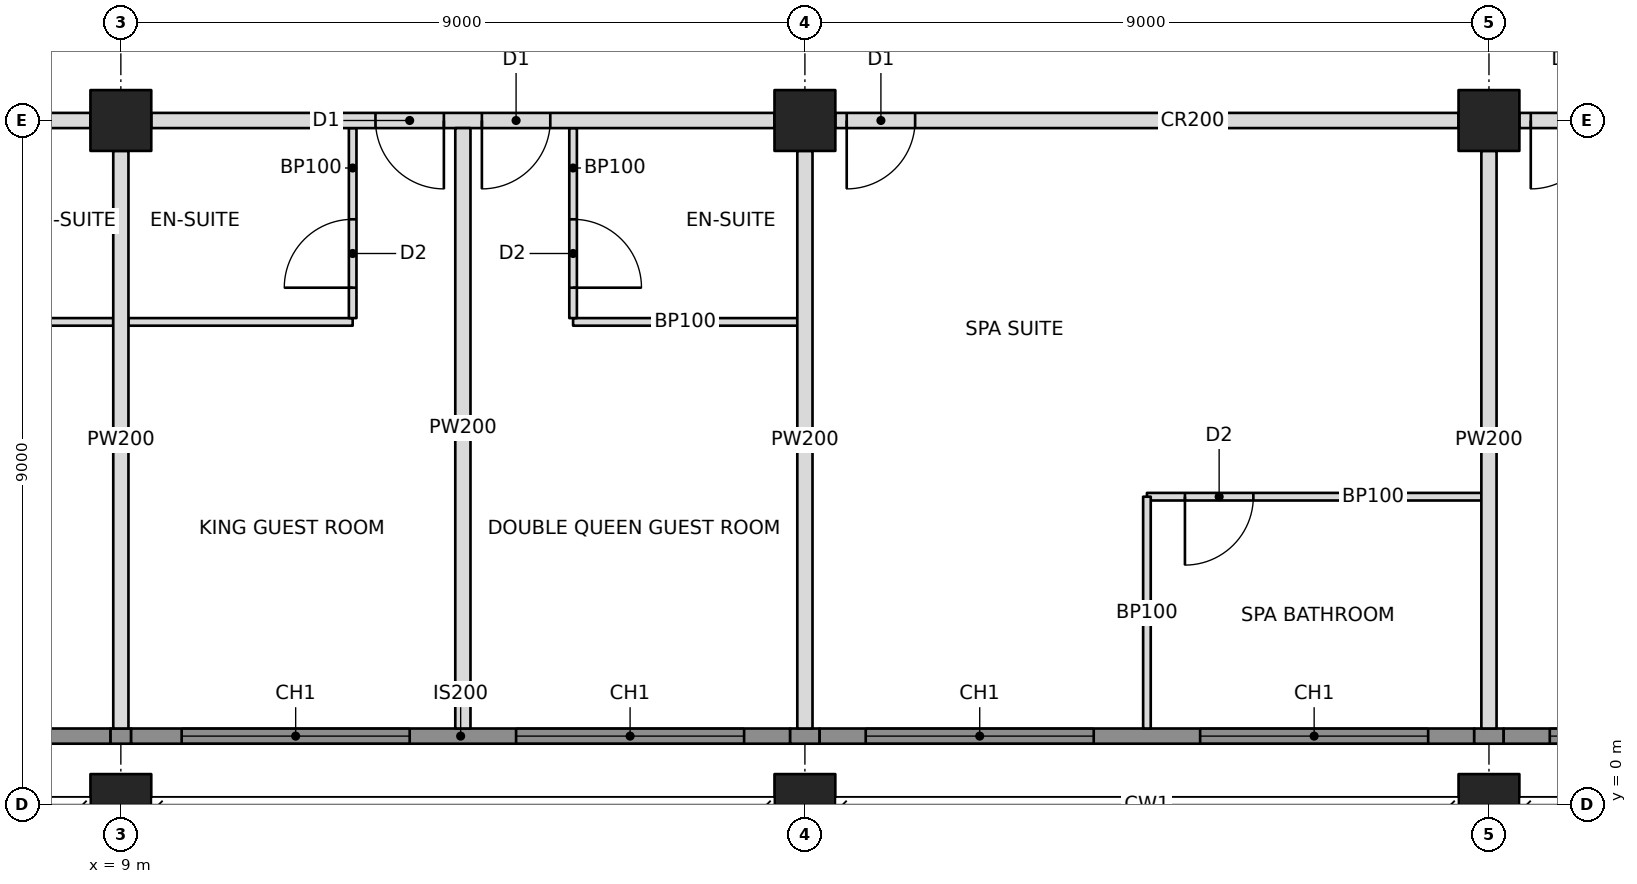
"""IFC4 building model, lengths in metres.
Left out: names, types, materials, properties, quantities, classifications, styles, units other than length and angle.
Written with IfcOpenShell. Run it as: python <this file> out.ifc"""

import sys

from ifc_helpers import new_model, si_unit, direction, frame, frame_2d, origin, origin_2d, place, context, subcontext, project, spatial, rectangle, hollow_rectangle, extrude, element, fill, save


model = new_model("IFC4")
c1 = context("Model", 3, precision=1e-05, world=origin(), true_north=direction((0.0, 1.0)))
c2 = subcontext(c1, "Body", "Model", "MODEL_VIEW")
j1 = project(units=[si_unit("LENGTHUNIT", "METRE"), si_unit("PLANEANGLEUNIT", "RADIAN")], contexts=[c1])
p1 = place(None, origin())
s1 = spatial("IfcSite", under=j1, at=p1, CompositionType="ELEMENT")
p2 = place(p1, origin())
s2 = spatial("IfcBuilding", under=s1, at=p2, CompositionType="ELEMENT")
p3 = place(p2, frame((0.0, 0.0, 191.0)))
s3 = spatial("IfcBuildingStorey", under=s2, at=p3, CompositionType="ELEMENT", Elevation=191.0)
p4 = place(p3, frame((9.0, 0.0, 0.0), z_axis=(0.0, 0.0, 1.0), x_axis=(1.0, 0.0, 0.0)))
e1 = element("IfcColumn", 1, at=p4, inside=s3, PredefinedType="COLUMN", context=c2, shape_type="SweptSolid", body=[
    extrude(hollow_rectangle(XDim=0.8, YDim=0.8, WallThickness=0.07, at=origin_2d()), origin(), (0.0, 0.0, 1.0), 3.4),
])
p5 = place(p3, frame((9.0, 9.0, 0.0), z_axis=(0.0, 0.0, 1.0), x_axis=(1.0, 0.0, 0.0)))
e2 = element("IfcColumn", 2, at=p5, inside=s3, PredefinedType="COLUMN", context=c2, shape_type="SweptSolid", body=[
    extrude(hollow_rectangle(XDim=0.8, YDim=0.8, WallThickness=0.06, at=origin_2d()), origin(), (0.0, 0.0, 1.0), 3.4),
])
p6 = place(p3, frame((18.0, 0.0, 0.0), z_axis=(0.0, 0.0, 1.0), x_axis=(1.0, 0.0, 0.0)))
e3 = element("IfcColumn", 3, at=p6, inside=s3, PredefinedType="COLUMN", context=c2, shape_type="SweptSolid", body=[
    extrude(hollow_rectangle(XDim=0.8, YDim=0.8, WallThickness=0.07, at=origin_2d()), origin(), (0.0, 0.0, 1.0), 3.4),
])
p7 = place(p3, frame((18.0, 9.0, 0.0), z_axis=(0.0, 0.0, 1.0), x_axis=(1.0, 0.0, 0.0)))
e4 = element("IfcColumn", 4, at=p7, inside=s3, PredefinedType="COLUMN", context=c2, shape_type="SweptSolid", body=[
    extrude(hollow_rectangle(XDim=0.8, YDim=0.8, WallThickness=0.06, at=origin_2d()), origin(), (0.0, 0.0, 1.0), 3.4),
])
p8 = place(p3, frame((27.0, 0.0, 0.0), z_axis=(0.0, 0.0, 1.0), x_axis=(1.0, 0.0, 0.0)))
e5 = element("IfcColumn", 5, at=p8, inside=s3, PredefinedType="COLUMN", context=c2, shape_type="SweptSolid", body=[
    extrude(hollow_rectangle(XDim=0.8, YDim=0.8, WallThickness=0.07, at=origin_2d()), origin(), (0.0, 0.0, 1.0), 3.4),
])
p9 = place(p3, frame((27.0, 9.0, 0.0), z_axis=(0.0, 0.0, 1.0), x_axis=(1.0, 0.0, 0.0)))
e6 = element("IfcColumn", 6, at=p9, inside=s3, PredefinedType="COLUMN", context=c2, shape_type="SweptSolid", body=[
    extrude(hollow_rectangle(XDim=0.8, YDim=0.8, WallThickness=0.06, at=origin_2d()), origin(), (0.0, 0.0, 1.0), 3.4),
])
p10 = place(p3, frame((3.0, 0.9, 0.0), z_axis=(0.0, 0.0, 1.0), x_axis=(1.0, 0.0, 0.0)))
e7 = element("IfcWall", 7, at=p10, inside=s3, PredefinedType="SOLIDWALL", context=c2, shape_type="SweptSolid", body=[
    extrude(rectangle(XDim=5.865, YDim=0.2, at=frame_2d((2.932, 0.0))), origin(), (0.0, 0.0, 1.0), 3.2),
])
p11 = place(p10, frame((1.45, 0.0, 0.6)))
e8 = element("IfcOpeningElement", 8, at=p11, cuts=e7, PredefinedType="OPENING", context=c2, shape_type="SweptSolid", body=[
    extrude(rectangle(XDim=3.0, YDim=2.2, at=frame_2d((1.5, 1.1))), frame((0.0, 0.11, 0.0), z_axis=(0.0, -1.0, 0.0), x_axis=(1.0, 0.0, 0.0)), (0.0, 0.0, 1.0), 0.22),
])
p12 = place(p3, frame((1.0, 9.0, 0.0), z_axis=(0.0, 0.0, 1.0), x_axis=(1.0, 0.0, 0.0)))
e9 = element("IfcWall", 9, at=p12, inside=s3, PredefinedType="PARTITIONING", context=c2, shape_type="SweptSolid", body=[
    extrude(rectangle(XDim=7.6, YDim=0.2, at=frame_2d((3.8, 0.0))), origin(), (0.0, 0.0, 1.0), 2.438),
])
p13 = place(p12, frame((0.25, 0.0, 0.0)))
e10 = element("IfcOpeningElement", 10, at=p13, cuts=e9, PredefinedType="OPENING", context=c2, shape_type="SweptSolid", body=[
    extrude(rectangle(XDim=0.9, YDim=2.1, at=frame_2d((0.45, 1.05))), frame((0.0, 0.11, 0.0), z_axis=(0.0, -1.0, 0.0), x_axis=(1.0, 0.0, 0.0)), (0.0, 0.0, 1.0), 0.22),
])
p14 = place(p3, frame((9.4, 9.0, 0.0), z_axis=(0.0, 0.0, 1.0), x_axis=(1.0, 0.0, 0.0)))
e11 = element("IfcWall", 11, at=p14, inside=s3, PredefinedType="PARTITIONING", context=c2, shape_type="SweptSolid", body=[
    extrude(rectangle(XDim=8.2, YDim=0.2, at=frame_2d((4.1, 0.0))), origin(), (0.0, 0.0, 1.0), 2.405),
])
p15 = place(p14, frame((2.95, 0.0, 0.0)))
e12 = element("IfcOpeningElement", 12, at=p15, cuts=e11, PredefinedType="OPENING", context=c2, shape_type="SweptSolid", body=[
    extrude(rectangle(XDim=0.9, YDim=2.1, at=frame_2d((0.45, 1.05))), frame((0.0, 0.11, 0.0), z_axis=(0.0, -1.0, 0.0), x_axis=(1.0, 0.0, 0.0)), (0.0, 0.0, 1.0), 0.22),
])
p16 = place(p14, frame((4.35, 0.0, 0.0)))
e13 = element("IfcOpeningElement", 13, at=p16, cuts=e11, PredefinedType="OPENING", context=c2, shape_type="SweptSolid", body=[
    extrude(rectangle(XDim=0.9, YDim=2.1, at=frame_2d((0.45, 1.05))), frame((0.0, 0.11, 0.0), z_axis=(0.0, -1.0, 0.0), x_axis=(1.0, 0.0, 0.0)), (0.0, 0.0, 1.0), 0.22),
])
p17 = place(p3, frame((18.4, 9.0, 0.0), z_axis=(0.0, 0.0, 1.0), x_axis=(1.0, 0.0, 0.0)))
e14 = element("IfcWall", 14, at=p17, inside=s3, PredefinedType="PARTITIONING", context=c2, shape_type="SweptSolid", body=[
    extrude(rectangle(XDim=8.2, YDim=0.2, at=frame_2d((4.1, 0.0))), origin(), (0.0, 0.0, 1.0), 2.405),
])
p18 = place(p17, frame((0.15, 0.0, 0.0)))
e15 = element("IfcOpeningElement", 15, at=p18, cuts=e14, PredefinedType="OPENING", context=c2, shape_type="SweptSolid", body=[
    extrude(rectangle(XDim=0.9, YDim=2.1, at=frame_2d((0.45, 1.05))), frame((0.0, 0.11, 0.0), z_axis=(0.0, -1.0, 0.0), x_axis=(1.0, 0.0, 0.0)), (0.0, 0.0, 1.0), 0.22),
])
p19 = place(p3, frame((27.4, 9.0, 0.0), z_axis=(0.0, 0.0, 1.0), x_axis=(1.0, 0.0, 0.0)))
e16 = element("IfcWall", 16, at=p19, inside=s3, PredefinedType="PARTITIONING", context=c2, shape_type="SweptSolid", body=[
    extrude(rectangle(XDim=8.2, YDim=0.2, at=frame_2d((4.1, 0.0))), origin(), (0.0, 0.0, 1.0), 2.405),
])
p20 = place(p19, frame((0.15, 0.0, 0.0)))
e17 = element("IfcOpeningElement", 17, at=p20, cuts=e16, PredefinedType="OPENING", context=c2, shape_type="SweptSolid", body=[
    extrude(rectangle(XDim=0.9, YDim=2.1, at=frame_2d((0.45, 1.05))), frame((0.0, 0.11, 0.0), z_axis=(0.0, -1.0, 0.0), x_axis=(1.0, 0.0, 0.0)), (0.0, 0.0, 1.0), 0.22),
])
p21 = place(p3, frame((9.0, 8.6, 0.0), z_axis=(0.0, 0.0, 1.0), x_axis=(0.0, -1.0, 0.0)))
e18 = element("IfcWall", 18, at=p21, inside=s3, PredefinedType="PARTITIONING", context=c2, shape_type="SweptSolid", body=[
    extrude(rectangle(XDim=7.6, YDim=0.2, at=frame_2d((3.8, 0.0))), origin(), (0.0, 0.0, 1.0), 2.438),
])
p22 = place(p3, frame((13.5, 8.9, 0.0), z_axis=(0.0, 0.0, 1.0), x_axis=(0.0, -1.0, 0.0)))
e19 = element("IfcWall", 19, at=p22, inside=s3, PredefinedType="PARTITIONING", context=c2, shape_type="SweptSolid", body=[
    extrude(rectangle(XDim=7.9, YDim=0.2, at=frame_2d((3.95, 0.0))), origin(), (0.0, 0.0, 1.0), 2.404),
])
for number, where, z_axis, x_axis in (
    (20, (18.0, 8.6, 0.0), (0.0, 0.0, 1.0), (0.0, -1.0, 0.0)),
    (21, (27.0, 8.6, 0.0), (0.0, 0.0, 1.0), (0.0, -1.0, 0.0)),
):
    element("IfcWall", number, at=place(p3, frame(where, z_axis=z_axis, x_axis=x_axis)), inside=s3, PredefinedType="PARTITIONING", context=c2, shape_type="SweptSolid", body=[
        extrude(rectangle(XDim=7.6, YDim=0.2, at=frame_2d((3.8, 0.0))), origin(), (0.0, 0.0, 1.0), 2.405),
    ])
p23 = place(p3, frame((5.45, 6.35, 0.0), z_axis=(0.0, 0.0, 1.0), x_axis=(1.0, 0.0, 0.0)))
e22 = element("IfcWall", 22, at=p23, inside=s3, PredefinedType="PARTITIONING", context=c2, shape_type="SweptSolid", body=[
    extrude(rectangle(XDim=3.45, YDim=0.1, at=frame_2d((1.725, 0.0))), origin(), (0.0, 0.0, 1.0), 2.438),
])
p24 = place(p3, frame((9.1, 6.35, 0.0), z_axis=(0.0, 0.0, 1.0), x_axis=(1.0, 0.0, 0.0)))
e23 = element("IfcWall", 23, at=p24, inside=s3, PredefinedType="PARTITIONING", context=c2, shape_type="SweptSolid", body=[
    extrude(rectangle(XDim=2.95, YDim=0.1, at=frame_2d((1.475, 0.0))), origin(), (0.0, 0.0, 1.0), 2.438),
])
p25 = place(p3, frame((12.05, 8.9, 0.0), z_axis=(0.0, 0.0, 1.0), x_axis=(0.0, -1.0, 0.0)))
e24 = element("IfcWall", 24, at=p25, inside=s3, PredefinedType="PARTITIONING", context=c2, shape_type="SweptSolid", body=[
    extrude(rectangle(XDim=2.5, YDim=0.1, at=frame_2d((1.25, 0.0))), origin(), (0.0, 0.0, 1.0), 2.404),
])
p26 = place(p25, frame((1.2, 0.0, 0.0)))
e25 = element("IfcOpeningElement", 25, at=p26, cuts=e24, PredefinedType="OPENING", context=c2, shape_type="SweptSolid", body=[
    extrude(rectangle(XDim=0.9, YDim=2.1, at=frame_2d((0.45, 1.05))), frame((0.0, 0.06, 0.0), z_axis=(0.0, -1.0, 0.0), x_axis=(1.0, 0.0, 0.0)), (0.0, 0.0, 1.0), 0.12),
])
p27 = place(p3, frame((14.95, 6.35, 0.0), z_axis=(0.0, 0.0, 1.0), x_axis=(1.0, 0.0, 0.0)))
e26 = element("IfcWall", 26, at=p27, inside=s3, PredefinedType="PARTITIONING", context=c2, shape_type="SweptSolid", body=[
    extrude(rectangle(XDim=2.95, YDim=0.1, at=frame_2d((1.475, 0.0))), origin(), (0.0, 0.0, 1.0), 2.404),
])
p28 = place(p3, frame((14.95, 8.9, 0.0), z_axis=(0.0, 0.0, 1.0), x_axis=(0.0, -1.0, 0.0)))
e27 = element("IfcWall", 27, at=p28, inside=s3, PredefinedType="PARTITIONING", context=c2, shape_type="SweptSolid", body=[
    extrude(rectangle(XDim=2.5, YDim=0.1, at=frame_2d((1.25, 0.0))), origin(), (0.0, 0.0, 1.0), 2.404),
])
p29 = place(p28, frame((1.2, 0.0, 0.0)))
e28 = element("IfcOpeningElement", 28, at=p29, cuts=e27, PredefinedType="OPENING", context=c2, shape_type="SweptSolid", body=[
    extrude(rectangle(XDim=0.9, YDim=2.1, at=frame_2d((0.45, 1.05))), frame((0.0, 0.06, 0.0), z_axis=(0.0, -1.0, 0.0), x_axis=(1.0, 0.0, 0.0)), (0.0, 0.0, 1.0), 0.12),
])
p30 = place(p3, frame((22.5, 4.05, 0.0), z_axis=(0.0, 0.0, 1.0), x_axis=(1.0, 0.0, 0.0)))
e29 = element("IfcWall", 29, at=p30, inside=s3, PredefinedType="PARTITIONING", context=c2, shape_type="SweptSolid", body=[
    extrude(rectangle(XDim=4.4, YDim=0.1, at=frame_2d((2.2, 0.0))), origin(), (0.0, 0.0, 1.0), 2.404),
])
p31 = place(p30, frame((0.5, 0.0, 0.0)))
e30 = element("IfcOpeningElement", 30, at=p31, cuts=e29, PredefinedType="OPENING", context=c2, shape_type="SweptSolid", body=[
    extrude(rectangle(XDim=0.9, YDim=2.1, at=frame_2d((0.45, 1.05))), frame((0.0, 0.06, 0.0), z_axis=(0.0, -1.0, 0.0), x_axis=(1.0, 0.0, 0.0)), (0.0, 0.0, 1.0), 0.12),
])
p32 = place(p3, frame((22.5, 4.05, 0.0), z_axis=(0.0, 0.0, 1.0), x_axis=(0.0, -1.0, 0.0)))
e31 = element("IfcWall", 31, at=p32, inside=s3, PredefinedType="PARTITIONING", context=c2, shape_type="SweptSolid", body=[
    extrude(rectangle(XDim=3.05, YDim=0.1, at=frame_2d((1.525, 0.0))), origin(), (0.0, 0.0, 1.0), 3.2),
])
p33 = place(p3, frame((8.865, 0.9, 0.0), z_axis=(0.0, 0.0, 1.0), x_axis=(1.0, 0.0, 0.0)))
e32 = element("IfcWall", 32, at=p33, inside=s3, PredefinedType="SOLIDWALL", context=c2, shape_type="SweptSolid", body=[
    extrude(rectangle(XDim=0.271, YDim=0.2, at=frame_2d((0.135, 0.0))), origin(), (0.0, 0.0, 1.0), 2.438),
])
p34 = place(p3, frame((9.135, 0.9, 0.0), z_axis=(0.0, 0.0, 1.0), x_axis=(1.0, 0.0, 0.0)))
e33 = element("IfcWall", 33, at=p34, inside=s3, PredefinedType="SOLIDWALL", context=c2, shape_type="SweptSolid", body=[
    extrude(rectangle(XDim=8.671, YDim=0.2, at=frame_2d((4.335, 0.0))), origin(), (0.0, 0.0, 1.0), 3.2),
])
p35 = place(p34, frame((0.665, 0.0, 0.6)))
e34 = element("IfcOpeningElement", 34, at=p35, cuts=e33, PredefinedType="OPENING", context=c2, shape_type="SweptSolid", body=[
    extrude(rectangle(XDim=3.0, YDim=2.2, at=frame_2d((1.5, 1.1))), frame((0.0, 0.11, 0.0), z_axis=(0.0, -1.0, 0.0), x_axis=(1.0, 0.0, 0.0)), (0.0, 0.0, 1.0), 0.22),
])
p36 = place(p34, frame((5.065, 0.0, 0.6)))
e35 = element("IfcOpeningElement", 35, at=p36, cuts=e33, PredefinedType="OPENING", context=c2, shape_type="SweptSolid", body=[
    extrude(rectangle(XDim=3.0, YDim=2.2, at=frame_2d((1.5, 1.1))), frame((0.0, 0.11, 0.0), z_axis=(0.0, -1.0, 0.0), x_axis=(1.0, 0.0, 0.0)), (0.0, 0.0, 1.0), 0.22),
])
p37 = place(p3, frame((17.806, 0.9, 0.0), z_axis=(0.0, 0.0, 1.0), x_axis=(1.0, 0.0, 0.0)))
e36 = element("IfcWall", 36, at=p37, inside=s3, PredefinedType="SOLIDWALL", context=c2, shape_type="SweptSolid", body=[
    extrude(rectangle(XDim=0.388, YDim=0.2, at=frame_2d((0.194, 0.0))), origin(), (0.0, 0.0, 1.0), 2.404),
])
p38 = place(p3, frame((18.194, 0.9, 0.0), z_axis=(0.0, 0.0, 1.0), x_axis=(1.0, 0.0, 0.0)))
e37 = element("IfcWall", 37, at=p38, inside=s3, PredefinedType="SOLIDWALL", context=c2, shape_type="SweptSolid", body=[
    extrude(rectangle(XDim=8.612, YDim=0.2, at=frame_2d((4.306, 0.0))), origin(), (0.0, 0.0, 1.0), 3.2),
])
p39 = place(p38, frame((0.606, 0.0, 0.6)))
e38 = element("IfcOpeningElement", 38, at=p39, cuts=e37, PredefinedType="OPENING", context=c2, shape_type="SweptSolid", body=[
    extrude(rectangle(XDim=3.0, YDim=2.2, at=frame_2d((1.5, 1.1))), frame((0.0, 0.11, 0.0), z_axis=(0.0, -1.0, 0.0), x_axis=(1.0, 0.0, 0.0)), (0.0, 0.0, 1.0), 0.22),
])
p40 = place(p38, frame((5.006, 0.0, 0.6)))
e39 = element("IfcOpeningElement", 39, at=p40, cuts=e37, PredefinedType="OPENING", context=c2, shape_type="SweptSolid", body=[
    extrude(rectangle(XDim=3.0, YDim=2.2, at=frame_2d((1.5, 1.1))), frame((0.0, 0.11, 0.0), z_axis=(0.0, -1.0, 0.0), x_axis=(1.0, 0.0, 0.0)), (0.0, 0.0, 1.0), 0.22),
])
p41 = place(p3, frame((26.806, 0.9, 0.0), z_axis=(0.0, 0.0, 1.0), x_axis=(1.0, 0.0, 0.0)))
e40 = element("IfcWall", 40, at=p41, inside=s3, PredefinedType="SOLIDWALL", context=c2, shape_type="SweptSolid", body=[
    extrude(rectangle(XDim=0.388, YDim=0.2, at=frame_2d((0.194, 0.0))), origin(), (0.0, 0.0, 1.0), 2.404),
])
p42 = place(p3, frame((27.194, 0.9, 0.0), z_axis=(0.0, 0.0, 1.0), x_axis=(1.0, 0.0, 0.0)))
e41 = element("IfcWall", 41, at=p42, inside=s3, PredefinedType="SOLIDWALL", context=c2, shape_type="SweptSolid", body=[
    extrude(rectangle(XDim=8.671, YDim=0.2, at=frame_2d((4.335, 0.0))), origin(), (0.0, 0.0, 1.0), 3.2),
])
p43 = place(p42, frame((0.606, 0.0, 0.6)))
e42 = element("IfcOpeningElement", 42, at=p43, cuts=e41, PredefinedType="OPENING", context=c2, shape_type="SweptSolid", body=[
    extrude(rectangle(XDim=3.0, YDim=2.2, at=frame_2d((1.5, 1.1))), frame((0.0, 0.11, 0.0), z_axis=(0.0, -1.0, 0.0), x_axis=(1.0, 0.0, 0.0)), (0.0, 0.0, 1.0), 0.22),
])
p44 = place(p42, frame((5.006, 0.0, 0.6)))
e43 = element("IfcOpeningElement", 43, at=p44, cuts=e41, PredefinedType="OPENING", context=c2, shape_type="SweptSolid", body=[
    extrude(rectangle(XDim=3.0, YDim=2.2, at=frame_2d((1.5, 1.1))), frame((0.0, 0.11, 0.0), z_axis=(0.0, -1.0, 0.0), x_axis=(1.0, 0.0, 0.0)), (0.0, 0.0, 1.0), 0.22),
])
p45 = place(p35, origin())
e44 = element("IfcWindow", 44, at=p45, inside=s3, PartitioningType="TRIPLE_PANEL_VERTICAL", PredefinedType="WINDOW", context=c2, shape_type="SweptSolid", body=[
    extrude(rectangle(XDim=3.0, YDim=2.2, at=frame_2d((1.5, 1.1))), frame((0.0, 0.03, 0.0), z_axis=(0.0, -1.0, 0.0), x_axis=(1.0, 0.0, 0.0)), (0.0, 0.0, 1.0), 0.06),
])
fill(e34, e44)
p46 = place(p36, origin())
e45 = element("IfcWindow", 45, at=p46, inside=s3, PartitioningType="TRIPLE_PANEL_VERTICAL", PredefinedType="WINDOW", context=c2, shape_type="SweptSolid", body=[
    extrude(rectangle(XDim=3.0, YDim=2.2, at=frame_2d((1.5, 1.1))), frame((0.0, 0.03, 0.0), z_axis=(0.0, -1.0, 0.0), x_axis=(1.0, 0.0, 0.0)), (0.0, 0.0, 1.0), 0.06),
])
fill(e35, e45)
p47 = place(p39, origin())
e46 = element("IfcWindow", 46, at=p47, inside=s3, PartitioningType="TRIPLE_PANEL_VERTICAL", PredefinedType="WINDOW", context=c2, shape_type="SweptSolid", body=[
    extrude(rectangle(XDim=3.0, YDim=2.2, at=frame_2d((1.5, 1.1))), frame((0.0, 0.03, 0.0), z_axis=(0.0, -1.0, 0.0), x_axis=(1.0, 0.0, 0.0)), (0.0, 0.0, 1.0), 0.06),
])
fill(e38, e46)
p48 = place(p40, origin())
e47 = element("IfcWindow", 47, at=p48, inside=s3, PartitioningType="TRIPLE_PANEL_VERTICAL", PredefinedType="WINDOW", context=c2, shape_type="SweptSolid", body=[
    extrude(rectangle(XDim=3.0, YDim=2.2, at=frame_2d((1.5, 1.1))), frame((0.0, 0.03, 0.0), z_axis=(0.0, -1.0, 0.0), x_axis=(1.0, 0.0, 0.0)), (0.0, 0.0, 1.0), 0.06),
])
fill(e39, e47)
p49 = place(p43, origin())
e48 = element("IfcWindow", 48, at=p49, inside=s3, PartitioningType="TRIPLE_PANEL_VERTICAL", PredefinedType="WINDOW", context=c2, shape_type="SweptSolid", body=[
    extrude(rectangle(XDim=3.0, YDim=2.2, at=frame_2d((1.5, 1.1))), frame((0.0, 0.03, 0.0), z_axis=(0.0, -1.0, 0.0), x_axis=(1.0, 0.0, 0.0)), (0.0, 0.0, 1.0), 0.06),
])
fill(e42, e48)
p50 = place(p26, frame((0.9, 0.0, 0.0), z_axis=(0.0, 0.0, 1.0), x_axis=(-1.0, 0.0, 0.0)))
e49 = element("IfcDoor", 49, at=p50, inside=s3, OperationType="SINGLE_SWING_LEFT", PredefinedType="DOOR", context=c2, shape_type="SweptSolid", body=[
    extrude(rectangle(XDim=0.9, YDim=2.1, at=frame_2d((0.45, 1.05))), frame((0.0, 0.025, 0.0), z_axis=(0.0, -1.0, 0.0), x_axis=(1.0, 0.0, 0.0)), (0.0, 0.0, 1.0), 0.05),
])
fill(e25, e49)
p51 = place(p15, frame((0.9, 0.0, 0.0), z_axis=(0.0, 0.0, 1.0), x_axis=(-1.0, 0.0, 0.0)))
e50 = element("IfcDoor", 50, at=p51, inside=s3, OperationType="SINGLE_SWING_LEFT", PredefinedType="DOOR", context=c2, shape_type="SweptSolid", body=[
    extrude(rectangle(XDim=0.9, YDim=2.1, at=frame_2d((0.45, 1.05))), frame((0.0, 0.025, 0.0), z_axis=(0.0, -1.0, 0.0), x_axis=(1.0, 0.0, 0.0)), (0.0, 0.0, 1.0), 0.05),
])
fill(e12, e50)
p52 = place(p29, origin())
e51 = element("IfcDoor", 51, at=p52, inside=s3, OperationType="SINGLE_SWING_RIGHT", PredefinedType="DOOR", context=c2, shape_type="SweptSolid", body=[
    extrude(rectangle(XDim=0.9, YDim=2.1, at=frame_2d((0.45, 1.05))), frame((0.0, 0.025, 0.0), z_axis=(0.0, -1.0, 0.0), x_axis=(1.0, 0.0, 0.0)), (0.0, 0.0, 1.0), 0.05),
])
fill(e28, e51)
p53 = place(p16, frame((0.9, 0.0, 0.0), z_axis=(0.0, 0.0, 1.0), x_axis=(-1.0, 0.0, 0.0)))
e52 = element("IfcDoor", 52, at=p53, inside=s3, OperationType="SINGLE_SWING_RIGHT", PredefinedType="DOOR", context=c2, shape_type="SweptSolid", body=[
    extrude(rectangle(XDim=0.9, YDim=2.1, at=frame_2d((0.45, 1.05))), frame((0.0, 0.025, 0.0), z_axis=(0.0, -1.0, 0.0), x_axis=(1.0, 0.0, 0.0)), (0.0, 0.0, 1.0), 0.05),
])
fill(e13, e52)
p54 = place(p31, frame((0.9, 0.0, 0.0), z_axis=(0.0, 0.0, 1.0), x_axis=(-1.0, 0.0, 0.0)))
e53 = element("IfcDoor", 53, at=p54, inside=s3, OperationType="SINGLE_SWING_RIGHT", PredefinedType="DOOR", context=c2, shape_type="SweptSolid", body=[
    extrude(rectangle(XDim=0.9, YDim=2.1, at=frame_2d((0.45, 1.05))), frame((0.0, 0.025, 0.0), z_axis=(0.0, -1.0, 0.0), x_axis=(1.0, 0.0, 0.0)), (0.0, 0.0, 1.0), 0.05),
])
fill(e30, e53)
p55 = place(p18, frame((0.9, 0.0, 0.0), z_axis=(0.0, 0.0, 1.0), x_axis=(-1.0, 0.0, 0.0)))
e54 = element("IfcDoor", 54, at=p55, inside=s3, OperationType="SINGLE_SWING_RIGHT", PredefinedType="DOOR", context=c2, shape_type="SweptSolid", body=[
    extrude(rectangle(XDim=0.9, YDim=2.1, at=frame_2d((0.45, 1.05))), frame((0.0, 0.025, 0.0), z_axis=(0.0, -1.0, 0.0), x_axis=(1.0, 0.0, 0.0)), (0.0, 0.0, 1.0), 0.05),
])
fill(e15, e54)
p56 = place(p20, frame((0.9, 0.0, 0.0), z_axis=(0.0, 0.0, 1.0), x_axis=(-1.0, 0.0, 0.0)))
e55 = element("IfcDoor", 55, at=p56, inside=s3, OperationType="SINGLE_SWING_RIGHT", PredefinedType="DOOR", context=c2, shape_type="SweptSolid", body=[
    extrude(rectangle(XDim=0.9, YDim=2.1, at=frame_2d((0.45, 1.05))), frame((0.0, 0.025, 0.0), z_axis=(0.0, -1.0, 0.0), x_axis=(1.0, 0.0, 0.0)), (0.0, 0.0, 1.0), 0.05),
])
fill(e17, e55)
save(model, sys.argv[1])
